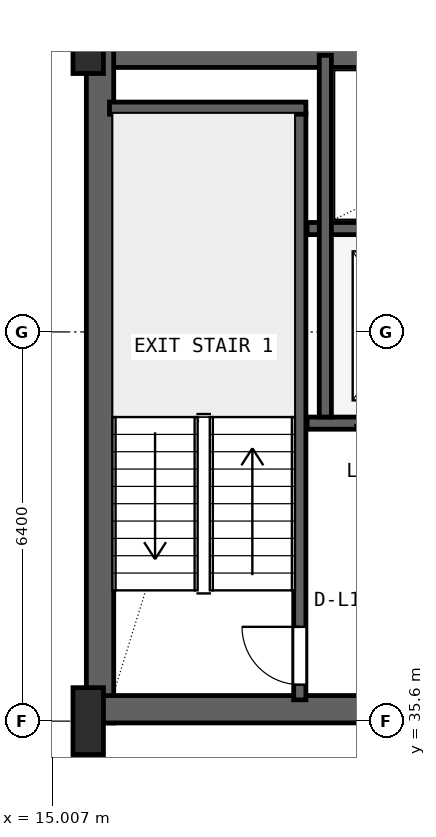
"""IFC4 building model, lengths in metres.
Left out: names, types, materials, properties, quantities, classifications, styles, units other than length and angle.
Written with IfcOpenShell. Run it as: python <this file> out.ifc"""

import sys

from ifc_helpers import new_model, si_unit, direction, frame, frame_2d, origin, origin_2d, place, context, subcontext, project, spatial, rectangle, i_section, extrude, source, transform, mapped, element, fill, save


model = new_model("IFC4")
c1 = context("Model", 3, precision=1e-05, world=origin(), true_north=direction((0.0, 1.0)))
c2 = subcontext(c1, "Body", "Model", "MODEL_VIEW")
j1 = project(units=[si_unit("LENGTHUNIT", "METRE"), si_unit("PLANEANGLEUNIT", "RADIAN")], contexts=[c1])
p1 = place(None, origin())
s1 = spatial("IfcSite", under=j1, at=p1, CompositionType="ELEMENT")
p2 = place(p1, origin())
s2 = spatial("IfcBuilding", under=s1, at=p2, CompositionType="ELEMENT")
p3 = place(p2, frame((0.0, 0.0, 47.1)))
s3 = spatial("IfcBuildingStorey", under=s2, at=p3, CompositionType="ELEMENT", Elevation=47.1)
p4 = place(p3, frame((15.6, 46.575, 0.0), z_axis=(0.0, 0.0, 1.0), x_axis=(1.0, 0.0, 0.0)))
e1 = element("IfcWall", 1, at=p4, inside=s3, PredefinedType="SHEAR", context=c2, shape_type="SweptSolid", body=[
    extrude(rectangle(XDim=36.8, YDim=0.45, at=frame_2d((18.4, 0.0))), origin(), (0.0, 0.0, 1.0), 3.65),
])
p5 = place(p3, frame((15.795, 35.57, 0.0), z_axis=(0.0, 0.0, 1.0), x_axis=(0.0, 1.0, 0.0)))
e2 = element("IfcWall", 2, at=p5, inside=s3, PredefinedType="SHEAR", context=c2, shape_type="SweptSolid", body=[
    extrude(rectangle(XDim=11.23, YDim=0.45, at=frame_2d((5.615, 0.0))), origin(), (0.0, 0.0, 1.0), 3.65),
])
p6 = place(p3, frame((15.57, 35.795, 0.0), z_axis=(0.0, 0.0, 1.0), x_axis=(1.0, 0.0, 0.0)))
e3 = element("IfcWall", 3, at=p6, inside=s3, PredefinedType="SHEAR", context=c2, shape_type="SweptSolid", body=[
    extrude(rectangle(XDim=9.23, YDim=0.45, at=frame_2d((4.615, 0.0))), origin(), (0.0, 0.0, 1.0), 3.65),
])
p7 = place(p6, frame((5.4, 0.0, 0.0)))
e4 = element("IfcOpeningElement", 4, at=p7, cuts=e3, PredefinedType="OPENING", context=c2, shape_type="SweptSolid", body=[
    extrude(rectangle(XDim=1.0, YDim=2.1, at=frame_2d((0.5, 1.05))), frame((0.0, 0.235, 0.0), z_axis=(0.0, -1.0, 0.0), x_axis=(1.0, 0.0, 0.0)), (0.0, 0.0, 1.0), 0.47),
])
m1 = source(origin(), c2, "Body", "SweptSolid", [
    extrude(i_section(OverallWidth=0.5, OverallDepth=1.1, WebThickness=0.018, FlangeThickness=0.032, FilletRadius=0.018, at=origin_2d()), origin(), (0.0, 0.0, 1.0), 3.9),
])
for number, where, z_axis, x_axis in (
    (5, (15.6, 35.6, 0.0), (0.0, 0.0, 1.0), (1.0, 0.0, 0.0)),
    (6, (15.6, 46.8, 0.0), (0.0, 0.0, 1.0), (1.0, 0.0, 0.0)),
):
    element("IfcColumn", number, at=place(p3, frame(where, z_axis=z_axis, x_axis=x_axis)), inside=s3, PredefinedType="COLUMN", context=c2, shape_type="MappedRepresentation", body=[
        mapped(m1, transform((0.0, 0.0, 0.0), x_axis=(1.0, 0.0, 0.0), y_axis=(0.0, 1.0, 0.0), z_axis=(0.0, 0.0, 1.0), scale=1.0)),
    ])
p8 = place(p3, frame((19.08, 35.95, 0.0), z_axis=(0.0, 0.0, 1.0), x_axis=(0.0, 1.0, 0.0)))
e7 = element("IfcWall", 7, at=p8, inside=s3, PredefinedType="SHEAR", context=c2, shape_type="SweptSolid", body=[
    extrude(rectangle(XDim=9.65, YDim=0.2, at=frame_2d((4.825, 0.0))), origin(), (0.0, 0.0, 1.0), 3.65),
])
p9 = place(p8, frame((0.25, 0.0, 0.0)))
e8 = element("IfcOpeningElement", 8, at=p9, cuts=e7, PredefinedType="OPENING", context=c2, shape_type="SweptSolid", body=[
    extrude(rectangle(XDim=0.95, YDim=2.1, at=frame_2d((0.475, 1.05))), frame((0.0, 0.11, 0.0), z_axis=(0.0, -1.0, 0.0), x_axis=(1.0, 0.0, 0.0)), (0.0, 0.0, 1.0), 0.22),
])
p10 = place(p3, frame((15.95, 45.68, 0.0), z_axis=(0.0, 0.0, 1.0), x_axis=(1.0, 0.0, 0.0)))
e9 = element("IfcWall", 9, at=p10, inside=s3, PredefinedType="SHEAR", context=c2, shape_type="SweptSolid", body=[
    extrude(rectangle(XDim=3.23, YDim=0.2, at=frame_2d((1.615, 0.0))), origin(), (0.0, 0.0, 1.0), 3.65),
])
p11 = place(p3, frame((19.2, 40.5, 0.0), z_axis=(0.0, 0.0, 1.0), x_axis=(1.0, 0.0, 0.0)))
e10 = element("IfcWall", 10, at=p11, inside=s3, PredefinedType="SHEAR", context=c2, shape_type="SweptSolid", body=[
    extrude(rectangle(XDim=5.52, YDim=0.2, at=frame_2d((2.76, 0.0))), origin(), (0.0, 0.0, 1.0), 3.65),
])
p12 = place(p11, frame((1.05, 0.0, 0.0)))
e11 = element("IfcOpeningElement", 11, at=p12, cuts=e10, PredefinedType="OPENING", context=c2, shape_type="SweptSolid", body=[
    extrude(rectangle(XDim=1.1, YDim=2.18, at=frame_2d((0.55, 1.09))), frame((0.0, 0.11, 0.0), z_axis=(0.0, -1.0, 0.0), x_axis=(1.0, 0.0, 0.0)), (0.0, 0.0, 1.0), 0.22),
])
p13 = place(p11, frame((3.65, 0.0, 0.0)))
e12 = element("IfcOpeningElement", 12, at=p13, cuts=e10, PredefinedType="OPENING", context=c2, shape_type="SweptSolid", body=[
    extrude(rectangle(XDim=1.1, YDim=2.18, at=frame_2d((0.55, 1.09))), frame((0.0, 0.11, 0.0), z_axis=(0.0, -1.0, 0.0), x_axis=(1.0, 0.0, 0.0)), (0.0, 0.0, 1.0), 0.22),
])
p14 = place(p3, frame((19.2, 43.7, 0.0), z_axis=(0.0, 0.0, 1.0), x_axis=(1.0, 0.0, 0.0)))
e13 = element("IfcWall", 13, at=p14, inside=s3, PredefinedType="SHEAR", context=c2, shape_type="SweptSolid", body=[
    extrude(rectangle(XDim=5.52, YDim=0.2, at=frame_2d((2.76, 0.0))), origin(), (0.0, 0.0, 1.0), 3.65),
])
p15 = place(p3, frame((19.5, 40.6, 0.0), z_axis=(0.0, 0.0, 1.0), x_axis=(0.0, 1.0, 0.0)))
e14 = element("IfcWall", 14, at=p15, inside=s3, PredefinedType="SHEAR", context=c2, shape_type="SweptSolid", body=[
    extrude(rectangle(XDim=5.95, YDim=0.2, at=frame_2d((2.975, 0.0))), origin(), (0.0, 0.0, 1.0), 3.65),
])
m2 = source(origin(), c2, "Body", "SweptSolid", [
    extrude(rectangle(XDim=0.95, YDim=2.1, at=frame_2d((0.475, 1.05))), frame((0.0, 0.025, 0.0), z_axis=(0.0, -1.0, 0.0), x_axis=(1.0, 0.0, 0.0)), (0.0, 0.0, 1.0), 0.05),
])
p16 = place(p9, origin())
e15 = element("IfcDoor", 15, at=p16, inside=s3, OperationType="SINGLE_SWING_RIGHT", PredefinedType="DOOR", context=c2, shape_type="MappedRepresentation", body=[
    mapped(m2, transform((0.0, 0.0, 0.0), x_axis=(1.0, 0.0, 0.0), y_axis=(0.0, 1.0, 0.0), z_axis=(0.0, 0.0, 1.0), scale=1.0)),
])
fill(e8, e15)
save(model, sys.argv[1])
